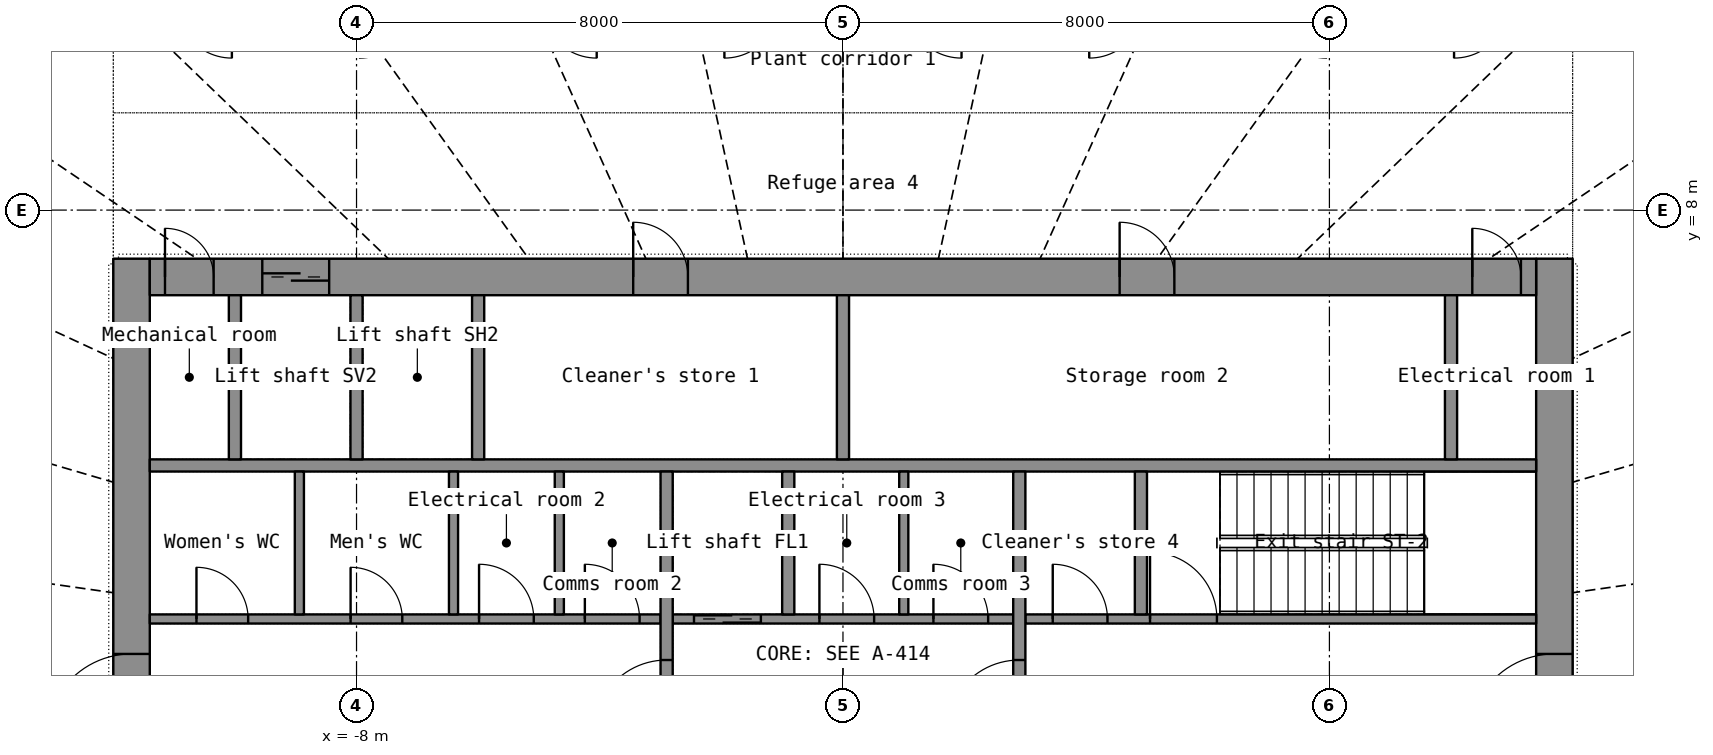
"""IFC4 building model, lengths in metres.
Left out: names, types, materials, properties, quantities, classifications, styles, units other than length and angle.
Written with IfcOpenShell. Run it as: python <this file> out.ifc"""

import sys

from ifc_helpers import new_model, si_unit, direction, frame, frame_2d, origin, place, context, subcontext, project, spatial, rectangle, extrude, element, fill, save


model = new_model("IFC4")
c1 = context("Model", 3, precision=1e-05, world=origin(), true_north=direction((0.0, 1.0)))
c2 = subcontext(c1, "Body", "Model", "MODEL_VIEW")
j1 = project(units=[si_unit("LENGTHUNIT", "METRE"), si_unit("PLANEANGLEUNIT", "RADIAN")], contexts=[c1])
p1 = place(None, origin())
s1 = spatial("IfcSite", under=j1, at=p1, CompositionType="ELEMENT")
p2 = place(p1, origin())
s2 = spatial("IfcBuilding", under=s1, at=p2, CompositionType="ELEMENT")
p3 = place(p2, frame((0.0, 0.0, 92.6)))
s3 = spatial("IfcBuildingStorey", under=s2, at=p3, CompositionType="ELEMENT", Elevation=92.6)
p4 = place(p3, frame((-11.7, -7.2, 0.0), z_axis=(0.0, 0.0, 1.0), x_axis=(0.0, 1.0, 0.0)))
e1 = element("IfcWall", 1, at=p4, inside=s3, PredefinedType="SHEAR", context=c2, shape_type="SweptSolid", body=[
    extrude(rectangle(XDim=14.4, YDim=0.6, at=frame_2d((7.2, 0.0))), origin(), (0.0, 0.0, 1.0), 4.1),
])
p5 = place(p4, frame((6.5, 0.0, 0.0)))
e2 = element("IfcOpeningElement", 2, at=p5, cuts=e1, PredefinedType="OPENING", context=c2, shape_type="SweptSolid", body=[
    extrude(rectangle(XDim=1.4, YDim=2.2, at=frame_2d((0.7, 1.1))), frame((0.0, 0.31, 0.0), z_axis=(0.0, -1.0, 0.0), x_axis=(1.0, 0.0, 0.0)), (0.0, 0.0, 1.0), 0.62),
])
p6 = place(p3, frame((11.7, -7.2, 0.0), z_axis=(0.0, 0.0, 1.0), x_axis=(0.0, 1.0, 0.0)))
e3 = element("IfcWall", 3, at=p6, inside=s3, PredefinedType="SHEAR", context=c2, shape_type="SweptSolid", body=[
    extrude(rectangle(XDim=14.4, YDim=0.6, at=frame_2d((7.2, 0.0))), origin(), (0.0, 0.0, 1.0), 4.1),
])
p7 = place(p6, frame((6.5, 0.0, 0.0)))
e4 = element("IfcOpeningElement", 4, at=p7, cuts=e3, PredefinedType="OPENING", context=c2, shape_type="SweptSolid", body=[
    extrude(rectangle(XDim=1.4, YDim=2.2, at=frame_2d((0.7, 1.1))), frame((0.0, 0.31, 0.0), z_axis=(0.0, -1.0, 0.0), x_axis=(1.0, 0.0, 0.0)), (0.0, 0.0, 1.0), 0.62),
])
p8 = place(p3, frame((-11.4, 6.9, 0.0), z_axis=(0.0, 0.0, 1.0), x_axis=(1.0, 0.0, 0.0)))
e5 = element("IfcWall", 5, at=p8, inside=s3, PredefinedType="SHEAR", context=c2, shape_type="SweptSolid", body=[
    extrude(rectangle(XDim=22.8, YDim=0.6, at=frame_2d((11.4, 0.0))), origin(), (0.0, 0.0, 1.0), 4.1),
])
p9 = place(p8, frame((1.85, 0.0, 0.0)))
e6 = element("IfcOpeningElement", 6, at=p9, cuts=e5, PredefinedType="OPENING", context=c2, shape_type="SweptSolid", body=[
    extrude(rectangle(XDim=1.1, YDim=2.2, at=frame_2d((0.55, 1.1))), frame((0.0, 0.31, 0.0), z_axis=(0.0, -1.0, 0.0), x_axis=(1.0, 0.0, 0.0)), (0.0, 0.0, 1.0), 0.62),
])
p10 = place(p8, frame((7.95, 0.0, 0.0)))
e7 = element("IfcOpeningElement", 7, at=p10, cuts=e5, PredefinedType="OPENING", context=c2, shape_type="SweptSolid", body=[
    extrude(rectangle(XDim=0.9, YDim=2.1, at=frame_2d((0.45, 1.05))), frame((0.0, 0.31, 0.0), z_axis=(0.0, -1.0, 0.0), x_axis=(1.0, 0.0, 0.0)), (0.0, 0.0, 1.0), 0.62),
])
p11 = place(p8, frame((15.95, 0.0, 0.0)))
e8 = element("IfcOpeningElement", 8, at=p11, cuts=e5, PredefinedType="OPENING", context=c2, shape_type="SweptSolid", body=[
    extrude(rectangle(XDim=0.9, YDim=2.1, at=frame_2d((0.45, 1.05))), frame((0.0, 0.31, 0.0), z_axis=(0.0, -1.0, 0.0), x_axis=(1.0, 0.0, 0.0)), (0.0, 0.0, 1.0), 0.62),
])
p12 = place(p8, frame((0.25, 0.0, 0.0)))
e9 = element("IfcOpeningElement", 9, at=p12, cuts=e5, PredefinedType="OPENING", context=c2, shape_type="SweptSolid", body=[
    extrude(rectangle(XDim=0.8, YDim=2.05, at=frame_2d((0.4, 1.025))), frame((0.0, 0.31, 0.0), z_axis=(0.0, -1.0, 0.0), x_axis=(1.0, 0.0, 0.0)), (0.0, 0.0, 1.0), 0.62),
])
p13 = place(p8, frame((21.75, 0.0, 0.0)))
e10 = element("IfcOpeningElement", 10, at=p13, cuts=e5, PredefinedType="OPENING", context=c2, shape_type="SweptSolid", body=[
    extrude(rectangle(XDim=0.8, YDim=2.05, at=frame_2d((0.4, 1.025))), frame((0.0, 0.31, 0.0), z_axis=(0.0, -1.0, 0.0), x_axis=(1.0, 0.0, 0.0)), (0.0, 0.0, 1.0), 0.62),
])
p14 = place(p3, frame((-11.4, 3.8, 0.0), z_axis=(0.0, 0.0, 1.0), x_axis=(1.0, 0.0, 0.0)))
e11 = element("IfcWall", 11, at=p14, inside=s3, PredefinedType="SHEAR", context=c2, shape_type="SweptSolid", body=[
    extrude(rectangle(XDim=22.8, YDim=0.2, at=frame_2d((11.4, 0.0))), origin(), (0.0, 0.0, 1.0), 4.1),
])
for number, where, z_axis, x_axis in (
    (12, (-10.0, 3.9, 0.0), (0.0, 0.0, 1.0), (0.0, 1.0, 0.0)),
    (13, (-8.0, 3.9, 0.0), (0.0, 0.0, 1.0), (0.0, 1.0, 0.0)),
    (14, (-6.0, 3.9, 0.0), (0.0, 0.0, 1.0), (0.0, 1.0, 0.0)),
    (15, (10.0, 3.9, 0.0), (0.0, 0.0, 1.0), (0.0, 1.0, 0.0)),
):
    element("IfcWall", number, at=place(p3, frame(where, z_axis=z_axis, x_axis=x_axis)), inside=s3, PredefinedType="SHEAR", context=c2, shape_type="SweptSolid", body=[
        extrude(rectangle(XDim=2.7, YDim=0.2, at=frame_2d((1.35, 0.0))), origin(), (0.0, 0.0, 1.0), 4.1),
    ])
p15 = place(p3, frame((0.0, 3.9, 0.0), z_axis=(0.0, 0.0, 1.0), x_axis=(0.0, 1.0, 0.0)))
e16 = element("IfcWall", 16, at=p15, inside=s3, PredefinedType="PARTITIONING", context=c2, shape_type="SweptSolid", body=[
    extrude(rectangle(XDim=2.7, YDim=0.2, at=frame_2d((1.35, 0.0))), origin(), (0.0, 0.0, 1.0), 4.1),
])
p16 = place(p3, frame((-11.4, 1.275, 0.0), z_axis=(0.0, 0.0, 1.0), x_axis=(1.0, 0.0, 0.0)))
e17 = element("IfcWall", 17, at=p16, inside=s3, PredefinedType="PARTITIONING", context=c2, shape_type="SweptSolid", body=[
    extrude(rectangle(XDim=8.4, YDim=0.15, at=frame_2d((4.2, 0.0))), origin(), (0.0, 0.0, 1.0), 4.1),
])
p17 = place(p16, frame((0.768, 0.0, 0.0)))
e18 = element("IfcOpeningElement", 18, at=p17, cuts=e17, PredefinedType="OPENING", context=c2, shape_type="SweptSolid", body=[
    extrude(rectangle(XDim=0.85, YDim=2.1, at=frame_2d((0.425, 1.05))), frame((0.0, 0.085, 0.0), z_axis=(0.0, -1.0, 0.0), x_axis=(1.0, 0.0, 0.0)), (0.0, 0.0, 1.0), 0.17),
])
p18 = place(p16, frame((3.302, 0.0, 0.0)))
e19 = element("IfcOpeningElement", 19, at=p18, cuts=e17, PredefinedType="OPENING", context=c2, shape_type="SweptSolid", body=[
    extrude(rectangle(XDim=0.85, YDim=2.1, at=frame_2d((0.425, 1.05))), frame((0.0, 0.085, 0.0), z_axis=(0.0, -1.0, 0.0), x_axis=(1.0, 0.0, 0.0)), (0.0, 0.0, 1.0), 0.17),
])
p19 = place(p16, frame((5.415, 0.0, 0.0)))
e20 = element("IfcOpeningElement", 20, at=p19, cuts=e17, PredefinedType="OPENING", context=c2, shape_type="SweptSolid", body=[
    extrude(rectangle(XDim=0.9, YDim=2.1, at=frame_2d((0.45, 1.05))), frame((0.0, 0.085, 0.0), z_axis=(0.0, -1.0, 0.0), x_axis=(1.0, 0.0, 0.0)), (0.0, 0.0, 1.0), 0.17),
])
p20 = place(p16, frame((7.155, 0.0, 0.0)))
e21 = element("IfcOpeningElement", 21, at=p20, cuts=e17, PredefinedType="OPENING", context=c2, shape_type="SweptSolid", body=[
    extrude(rectangle(XDim=0.9, YDim=2.1, at=frame_2d((0.45, 1.05))), frame((0.0, 0.085, 0.0), z_axis=(0.0, -1.0, 0.0), x_axis=(1.0, 0.0, 0.0)), (0.0, 0.0, 1.0), 0.17),
])
p21 = place(p3, frame((-2.8, 1.275, 0.0), z_axis=(0.0, 0.0, 1.0), x_axis=(1.0, 0.0, 0.0)))
e22 = element("IfcWall", 22, at=p21, inside=s3, PredefinedType="SHEAR", context=c2, shape_type="SweptSolid", body=[
    extrude(rectangle(XDim=5.6, YDim=0.15, at=frame_2d((2.8, 0.0))), origin(), (0.0, 0.0, 1.0), 4.1),
])
p22 = place(p21, frame((0.35, 0.0, 0.0)))
e23 = element("IfcOpeningElement", 23, at=p22, cuts=e22, PredefinedType="OPENING", context=c2, shape_type="SweptSolid", body=[
    extrude(rectangle(XDim=1.1, YDim=2.2, at=frame_2d((0.55, 1.1))), frame((0.0, 0.085, 0.0), z_axis=(0.0, -1.0, 0.0), x_axis=(1.0, 0.0, 0.0)), (0.0, 0.0, 1.0), 0.17),
])
p23 = place(p21, frame((2.413, 0.0, 0.0)))
e24 = element("IfcOpeningElement", 24, at=p23, cuts=e22, PredefinedType="OPENING", context=c2, shape_type="SweptSolid", body=[
    extrude(rectangle(XDim=0.9, YDim=2.1, at=frame_2d((0.45, 1.05))), frame((0.0, 0.085, 0.0), z_axis=(0.0, -1.0, 0.0), x_axis=(1.0, 0.0, 0.0)), (0.0, 0.0, 1.0), 0.17),
])
p24 = place(p21, frame((4.288, 0.0, 0.0)))
e25 = element("IfcOpeningElement", 25, at=p24, cuts=e22, PredefinedType="OPENING", context=c2, shape_type="SweptSolid", body=[
    extrude(rectangle(XDim=0.9, YDim=2.1, at=frame_2d((0.45, 1.05))), frame((0.0, 0.085, 0.0), z_axis=(0.0, -1.0, 0.0), x_axis=(1.0, 0.0, 0.0)), (0.0, 0.0, 1.0), 0.17),
])
p25 = place(p3, frame((3.0, 1.275, 0.0), z_axis=(0.0, 0.0, 1.0), x_axis=(1.0, 0.0, 0.0)))
e26 = element("IfcWall", 26, at=p25, inside=s3, PredefinedType="SHEAR", context=c2, shape_type="SweptSolid", body=[
    extrude(rectangle(XDim=8.4, YDim=0.15, at=frame_2d((4.2, 0.0))), origin(), (0.0, 0.0, 1.0), 4.1),
])
p26 = place(p25, frame((2.05, 0.0, 0.0)))
e27 = element("IfcOpeningElement", 27, at=p26, cuts=e26, PredefinedType="OPENING", context=c2, shape_type="SweptSolid", body=[
    extrude(rectangle(XDim=1.1, YDim=2.15, at=frame_2d((0.55, 1.075))), frame((0.0, 0.085, 0.0), z_axis=(0.0, -1.0, 0.0), x_axis=(1.0, 0.0, 0.0)), (0.0, 0.0, 1.0), 0.17),
])
p27 = place(p25, frame((0.45, 0.0, 0.0)))
e28 = element("IfcOpeningElement", 28, at=p27, cuts=e26, PredefinedType="OPENING", context=c2, shape_type="SweptSolid", body=[
    extrude(rectangle(XDim=0.9, YDim=2.1, at=frame_2d((0.45, 1.05))), frame((0.0, 0.085, 0.0), z_axis=(0.0, -1.0, 0.0), x_axis=(1.0, 0.0, 0.0)), (0.0, 0.0, 1.0), 0.17),
])
p28 = place(p3, frame((-2.9, -3.7, 0.0), z_axis=(0.0, 0.0, 1.0), x_axis=(0.0, 1.0, 0.0)))
e29 = element("IfcWall", 29, at=p28, inside=s3, PredefinedType="SHEAR", context=c2, shape_type="SweptSolid", body=[
    extrude(rectangle(XDim=7.4, YDim=0.2, at=frame_2d((3.7, 0.0))), origin(), (0.0, 0.0, 1.0), 4.1),
])
p29 = place(p28, frame((3.1, 0.0, 0.0)))
e30 = element("IfcOpeningElement", 30, at=p29, cuts=e29, PredefinedType="OPENING", context=c2, shape_type="SweptSolid", body=[
    extrude(rectangle(XDim=1.2, YDim=2.2, at=frame_2d((0.6, 1.1))), frame((0.0, 0.11, 0.0), z_axis=(0.0, -1.0, 0.0), x_axis=(1.0, 0.0, 0.0)), (0.0, 0.0, 1.0), 0.22),
])
p30 = place(p3, frame((2.9, -3.7, 0.0), z_axis=(0.0, 0.0, 1.0), x_axis=(0.0, 1.0, 0.0)))
e31 = element("IfcWall", 31, at=p30, inside=s3, PredefinedType="SHEAR", context=c2, shape_type="SweptSolid", body=[
    extrude(rectangle(XDim=7.4, YDim=0.2, at=frame_2d((3.7, 0.0))), origin(), (0.0, 0.0, 1.0), 4.1),
])
p31 = place(p30, frame((3.1, 0.0, 0.0)))
e32 = element("IfcOpeningElement", 32, at=p31, cuts=e31, PredefinedType="OPENING", context=c2, shape_type="SweptSolid", body=[
    extrude(rectangle(XDim=1.2, YDim=2.2, at=frame_2d((0.6, 1.1))), frame((0.0, 0.11, 0.0), z_axis=(0.0, -1.0, 0.0), x_axis=(1.0, 0.0, 0.0)), (0.0, 0.0, 1.0), 0.22),
])
for number, where, z_axis, x_axis in (
    (33, (-0.9, 1.35, 0.0), (0.0, 0.0, 1.0), (0.0, 1.0, 0.0)),
    (34, (4.9, 1.35, 0.0), (0.0, 0.0, 1.0), (0.0, 1.0, 0.0)),
):
    element("IfcWall", number, at=place(p3, frame(where, z_axis=z_axis, x_axis=x_axis)), inside=s3, PredefinedType="SHEAR", context=c2, shape_type="SweptSolid", body=[
        extrude(rectangle(XDim=2.35, YDim=0.2, at=frame_2d((1.175, 0.0))), origin(), (0.0, 0.0, 1.0), 4.1),
    ])
for number, where, z_axis, x_axis in (
    (35, (-8.94, 1.35, 0.0), (0.0, 0.0, 1.0), (0.0, 1.0, 0.0)),
    (36, (-6.405, 1.35, 0.0), (0.0, 0.0, 1.0), (0.0, 1.0, 0.0)),
    (37, (-4.665, 1.35, 0.0), (0.0, 0.0, 1.0), (0.0, 1.0, 0.0)),
    (38, (1.0, 1.35, 0.0), (0.0, 0.0, 1.0), (0.0, 1.0, 0.0)),
):
    element("IfcWall", number, at=place(p3, frame(where, z_axis=z_axis, x_axis=x_axis)), inside=s3, PredefinedType="PARTITIONING", context=c2, shape_type="SweptSolid", body=[
        extrude(rectangle(XDim=2.35, YDim=0.15, at=frame_2d((1.175, 0.0))), origin(), (0.0, 0.0, 1.0), 4.1),
    ])
p32 = place(p9, origin())
e39 = element("IfcDoor", 39, at=p32, inside=s3, OperationType="DOUBLE_DOOR_SLIDING", PredefinedType="DOOR", context=c2, shape_type="SweptSolid", body=[
    extrude(rectangle(XDim=1.1, YDim=2.2, at=frame_2d((0.55, 1.1))), frame((0.0, 0.025, 0.0), z_axis=(0.0, -1.0, 0.0), x_axis=(1.0, 0.0, 0.0)), (0.0, 0.0, 1.0), 0.05),
])
fill(e6, e39)
p33 = place(p10, origin())
e40 = element("IfcDoor", 40, at=p33, inside=s3, OperationType="SINGLE_SWING_LEFT", PredefinedType="DOOR", context=c2, shape_type="SweptSolid", body=[
    extrude(rectangle(XDim=0.9, YDim=2.1, at=frame_2d((0.45, 1.05))), frame((0.0, 0.025, 0.0), z_axis=(0.0, -1.0, 0.0), x_axis=(1.0, 0.0, 0.0)), (0.0, 0.0, 1.0), 0.05),
])
fill(e7, e40)
p34 = place(p11, origin())
e41 = element("IfcDoor", 41, at=p34, inside=s3, OperationType="SINGLE_SWING_LEFT", PredefinedType="DOOR", context=c2, shape_type="SweptSolid", body=[
    extrude(rectangle(XDim=0.9, YDim=2.1, at=frame_2d((0.45, 1.05))), frame((0.0, 0.025, 0.0), z_axis=(0.0, -1.0, 0.0), x_axis=(1.0, 0.0, 0.0)), (0.0, 0.0, 1.0), 0.05),
])
fill(e8, e41)
p35 = place(p12, origin())
e42 = element("IfcDoor", 42, at=p35, inside=s3, OperationType="SINGLE_SWING_LEFT", PredefinedType="DOOR", context=c2, shape_type="SweptSolid", body=[
    extrude(rectangle(XDim=0.8, YDim=2.05, at=frame_2d((0.4, 1.025))), frame((0.0, 0.025, 0.0), z_axis=(0.0, -1.0, 0.0), x_axis=(1.0, 0.0, 0.0)), (0.0, 0.0, 1.0), 0.05),
])
fill(e9, e42)
p36 = place(p13, origin())
e43 = element("IfcDoor", 43, at=p36, inside=s3, OperationType="SINGLE_SWING_LEFT", PredefinedType="DOOR", context=c2, shape_type="SweptSolid", body=[
    extrude(rectangle(XDim=0.8, YDim=2.05, at=frame_2d((0.4, 1.025))), frame((0.0, 0.025, 0.0), z_axis=(0.0, -1.0, 0.0), x_axis=(1.0, 0.0, 0.0)), (0.0, 0.0, 1.0), 0.05),
])
fill(e10, e43)
p37 = place(p5, origin())
e44 = element("IfcDoor", 44, at=p37, inside=s3, OperationType="DOUBLE_DOOR_SINGLE_SWING", PredefinedType="DOOR", context=c2, shape_type="SweptSolid", body=[
    extrude(rectangle(XDim=1.4, YDim=2.2, at=frame_2d((0.7, 1.1))), frame((0.0, 0.025, 0.0), z_axis=(0.0, -1.0, 0.0), x_axis=(1.0, 0.0, 0.0)), (0.0, 0.0, 1.0), 0.05),
])
fill(e2, e44)
p38 = place(p7, origin())
e45 = element("IfcDoor", 45, at=p38, inside=s3, OperationType="DOUBLE_DOOR_SINGLE_SWING", PredefinedType="DOOR", context=c2, shape_type="SweptSolid", body=[
    extrude(rectangle(XDim=1.4, YDim=2.2, at=frame_2d((0.7, 1.1))), frame((0.0, 0.025, 0.0), z_axis=(0.0, -1.0, 0.0), x_axis=(1.0, 0.0, 0.0)), (0.0, 0.0, 1.0), 0.05),
])
fill(e4, e45)
p39 = place(p29, origin())
e46 = element("IfcDoor", 46, at=p39, inside=s3, OperationType="SINGLE_SWING_LEFT", PredefinedType="DOOR", context=c2, shape_type="SweptSolid", body=[
    extrude(rectangle(XDim=1.2, YDim=2.2, at=frame_2d((0.6, 1.1))), frame((0.0, 0.025, 0.0), z_axis=(0.0, -1.0, 0.0), x_axis=(1.0, 0.0, 0.0)), (0.0, 0.0, 1.0), 0.05),
])
fill(e30, e46)
p40 = place(p31, origin())
e47 = element("IfcDoor", 47, at=p40, inside=s3, OperationType="SINGLE_SWING_LEFT", PredefinedType="DOOR", context=c2, shape_type="SweptSolid", body=[
    extrude(rectangle(XDim=1.2, YDim=2.2, at=frame_2d((0.6, 1.1))), frame((0.0, 0.025, 0.0), z_axis=(0.0, -1.0, 0.0), x_axis=(1.0, 0.0, 0.0)), (0.0, 0.0, 1.0), 0.05),
])
fill(e32, e47)
p41 = place(p22, origin())
e48 = element("IfcDoor", 48, at=p41, inside=s3, OperationType="DOUBLE_DOOR_SLIDING", PredefinedType="DOOR", context=c2, shape_type="SweptSolid", body=[
    extrude(rectangle(XDim=1.1, YDim=2.2, at=frame_2d((0.55, 1.1))), frame((0.0, 0.025, 0.0), z_axis=(0.0, -1.0, 0.0), x_axis=(1.0, 0.0, 0.0)), (0.0, 0.0, 1.0), 0.05),
])
fill(e23, e48)
p42 = place(p26, origin())
e49 = element("IfcDoor", 49, at=p42, inside=s3, OperationType="SINGLE_SWING_LEFT", PredefinedType="DOOR", context=c2, shape_type="SweptSolid", body=[
    extrude(rectangle(XDim=1.1, YDim=2.15, at=frame_2d((0.55, 1.075))), frame((0.0, 0.025, 0.0), z_axis=(0.0, -1.0, 0.0), x_axis=(1.0, 0.0, 0.0)), (0.0, 0.0, 1.0), 0.05),
])
fill(e27, e49)
p43 = place(p17, origin())
e50 = element("IfcDoor", 50, at=p43, inside=s3, OperationType="SINGLE_SWING_LEFT", PredefinedType="DOOR", context=c2, shape_type="SweptSolid", body=[
    extrude(rectangle(XDim=0.85, YDim=2.1, at=frame_2d((0.425, 1.05))), frame((0.0, 0.025, 0.0), z_axis=(0.0, -1.0, 0.0), x_axis=(1.0, 0.0, 0.0)), (0.0, 0.0, 1.0), 0.05),
])
fill(e18, e50)
p44 = place(p18, origin())
e51 = element("IfcDoor", 51, at=p44, inside=s3, OperationType="SINGLE_SWING_LEFT", PredefinedType="DOOR", context=c2, shape_type="SweptSolid", body=[
    extrude(rectangle(XDim=0.85, YDim=2.1, at=frame_2d((0.425, 1.05))), frame((0.0, 0.025, 0.0), z_axis=(0.0, -1.0, 0.0), x_axis=(1.0, 0.0, 0.0)), (0.0, 0.0, 1.0), 0.05),
])
fill(e19, e51)
p45 = place(p19, origin())
e52 = element("IfcDoor", 52, at=p45, inside=s3, OperationType="SINGLE_SWING_LEFT", PredefinedType="DOOR", context=c2, shape_type="SweptSolid", body=[
    extrude(rectangle(XDim=0.9, YDim=2.1, at=frame_2d((0.45, 1.05))), frame((0.0, 0.025, 0.0), z_axis=(0.0, -1.0, 0.0), x_axis=(1.0, 0.0, 0.0)), (0.0, 0.0, 1.0), 0.05),
])
fill(e20, e52)
p46 = place(p20, origin())
e53 = element("IfcDoor", 53, at=p46, inside=s3, OperationType="SINGLE_SWING_LEFT", PredefinedType="DOOR", context=c2, shape_type="SweptSolid", body=[
    extrude(rectangle(XDim=0.9, YDim=2.1, at=frame_2d((0.45, 1.05))), frame((0.0, 0.025, 0.0), z_axis=(0.0, -1.0, 0.0), x_axis=(1.0, 0.0, 0.0)), (0.0, 0.0, 1.0), 0.05),
])
fill(e21, e53)
p47 = place(p23, origin())
e54 = element("IfcDoor", 54, at=p47, inside=s3, OperationType="SINGLE_SWING_LEFT", PredefinedType="DOOR", context=c2, shape_type="SweptSolid", body=[
    extrude(rectangle(XDim=0.9, YDim=2.1, at=frame_2d((0.45, 1.05))), frame((0.0, 0.025, 0.0), z_axis=(0.0, -1.0, 0.0), x_axis=(1.0, 0.0, 0.0)), (0.0, 0.0, 1.0), 0.05),
])
fill(e24, e54)
p48 = place(p24, origin())
e55 = element("IfcDoor", 55, at=p48, inside=s3, OperationType="SINGLE_SWING_LEFT", PredefinedType="DOOR", context=c2, shape_type="SweptSolid", body=[
    extrude(rectangle(XDim=0.9, YDim=2.1, at=frame_2d((0.45, 1.05))), frame((0.0, 0.025, 0.0), z_axis=(0.0, -1.0, 0.0), x_axis=(1.0, 0.0, 0.0)), (0.0, 0.0, 1.0), 0.05),
])
fill(e25, e55)
p49 = place(p27, origin())
e56 = element("IfcDoor", 56, at=p49, inside=s3, OperationType="SINGLE_SWING_LEFT", PredefinedType="DOOR", context=c2, shape_type="SweptSolid", body=[
    extrude(rectangle(XDim=0.9, YDim=2.1, at=frame_2d((0.45, 1.05))), frame((0.0, 0.025, 0.0), z_axis=(0.0, -1.0, 0.0), x_axis=(1.0, 0.0, 0.0)), (0.0, 0.0, 1.0), 0.05),
])
fill(e28, e56)
save(model, sys.argv[1])
